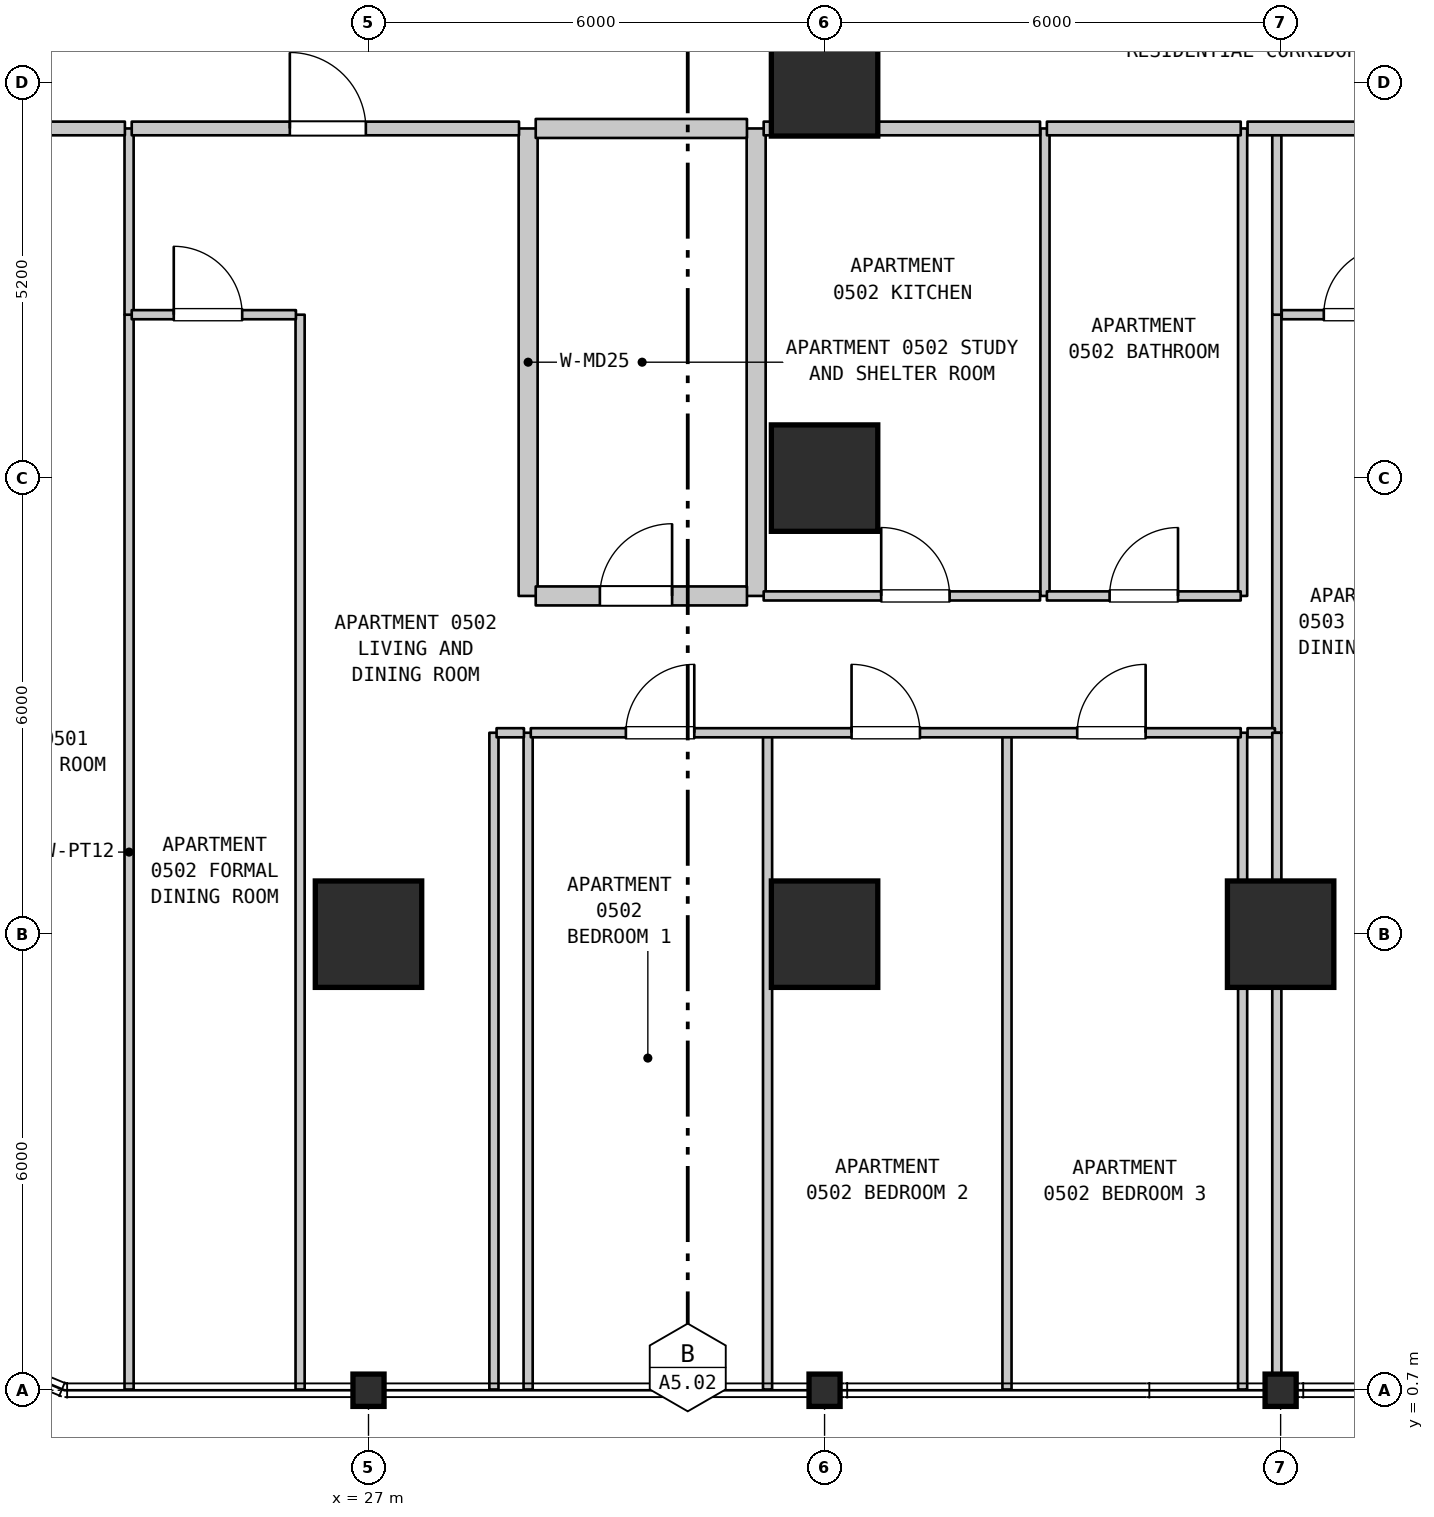
"""IFC4 building model, lengths in metres.
Left out: names, types, materials, properties, quantities, classifications, styles, units other than length and angle.
Written with IfcOpenShell. Run it as: python <this file> out.ifc"""

import sys

from ifc_helpers import new_model, si_unit, direction, frame, frame_2d, origin, origin_2d, place, context, subcontext, project, spatial, rectangle, i_section, extrude, element, fill, save


model = new_model("IFC4")
c1 = context("Model", 3, precision=1e-05, world=origin(), true_north=direction((0.0, 1.0)))
c2 = subcontext(c1, "Body", "Model", "MODEL_VIEW")
j1 = project(units=[si_unit("LENGTHUNIT", "METRE"), si_unit("PLANEANGLEUNIT", "RADIAN")], contexts=[c1])
p1 = place(None, origin())
s1 = spatial("IfcSite", under=j1, at=p1, CompositionType="ELEMENT")
p2 = place(p1, origin())
s2 = spatial("IfcBuilding", under=s1, at=p2, CompositionType="ELEMENT")
p3 = place(p2, frame((0.0, 0.0, 27.7)))
s3 = spatial("IfcBuildingStorey", under=s2, at=p3, CompositionType="ELEMENT", Elevation=27.7)
p4 = place(p3, frame((27.0, 0.7, 0.0), z_axis=(0.0, 0.0, 1.0), x_axis=(1.0, 0.0, 0.0)))
e1 = element("IfcColumn", 1, at=p4, inside=s3, PredefinedType="COLUMN", context=c2, shape_type="SweptSolid", body=[
    extrude(i_section(OverallWidth=0.409, OverallDepth=0.425, WebThickness=0.032, FlangeThickness=0.052, FilletRadius=0.015, at=origin_2d()), origin(), (0.0, 0.0, 1.0), 3.7),
])
p5 = place(p3, frame((27.0, 6.7, 0.0), z_axis=(0.0, 0.0, 1.0), x_axis=(1.0, 0.0, 0.0)))
e2 = element("IfcColumn", 2, at=p5, inside=s3, PredefinedType="COLUMN", context=c2, shape_type="SweptSolid", body=[
    extrude(rectangle(XDim=1.4, YDim=1.4, at=origin_2d()), origin(), (0.0, 0.0, 1.0), 3.7),
])
p6 = place(p3, frame((33.0, 0.7, 0.0), z_axis=(0.0, 0.0, 1.0), x_axis=(1.0, 0.0, 0.0)))
e3 = element("IfcColumn", 3, at=p6, inside=s3, PredefinedType="COLUMN", context=c2, shape_type="SweptSolid", body=[
    extrude(i_section(OverallWidth=0.409, OverallDepth=0.425, WebThickness=0.032, FlangeThickness=0.052, FilletRadius=0.015, at=origin_2d()), origin(), (0.0, 0.0, 1.0), 3.7),
])
for number, where, z_axis, x_axis in (
    (4, (33.0, 6.7, 0.0), (0.0, 0.0, 1.0), (1.0, 0.0, 0.0)),
    (5, (33.0, 12.7, 0.0), (0.0, 0.0, 1.0), (1.0, 0.0, 0.0)),
    (6, (33.0, 17.9, 0.0), (0.0, 0.0, 1.0), (1.0, 0.0, 0.0)),
):
    element("IfcColumn", number, at=place(p3, frame(where, z_axis=z_axis, x_axis=x_axis)), inside=s3, PredefinedType="COLUMN", context=c2, shape_type="SweptSolid", body=[
        extrude(rectangle(XDim=1.4, YDim=1.4, at=origin_2d()), origin(), (0.0, 0.0, 1.0), 3.7),
    ])
p7 = place(p3, frame((39.0, 0.7, 0.0), z_axis=(0.0, 0.0, 1.0), x_axis=(1.0, 0.0, 0.0)))
e7 = element("IfcColumn", 7, at=p7, inside=s3, PredefinedType="COLUMN", context=c2, shape_type="SweptSolid", body=[
    extrude(i_section(OverallWidth=0.409, OverallDepth=0.425, WebThickness=0.032, FlangeThickness=0.052, FilletRadius=0.015, at=origin_2d()), origin(), (0.0, 0.0, 1.0), 3.7),
])
p8 = place(p3, frame((39.0, 6.7, 0.0), z_axis=(0.0, 0.0, 1.0), x_axis=(1.0, 0.0, 0.0)))
e8 = element("IfcColumn", 8, at=p8, inside=s3, PredefinedType="COLUMN", context=c2, shape_type="SweptSolid", body=[
    extrude(rectangle(XDim=1.4, YDim=1.4, at=origin_2d()), origin(), (0.0, 0.0, 1.0), 3.7),
])
p9 = place(p3, frame((23.85, 0.71, 0.0), z_axis=(0.0, 0.0, 1.0), x_axis=(0.0, 1.0, 0.0)))
e9 = element("IfcWall", 9, at=p9, inside=s3, PredefinedType="PARTITIONING", context=c2, shape_type="SweptSolid", body=[
    extrude(rectangle(XDim=14.14, YDim=0.12, at=frame_2d((7.07, 0.0))), origin(), (0.0, 0.0, 1.0), 3.385),
])
p10 = place(p3, frame((23.85, 14.85, 0.0), z_axis=(0.0, 0.0, 1.0), x_axis=(0.0, 1.0, 0.0)))
e10 = element("IfcWall", 10, at=p10, inside=s3, PredefinedType="PARTITIONING", context=c2, shape_type="SweptSolid", body=[
    extrude(rectangle(XDim=2.45, YDim=0.12, at=frame_2d((1.225, 0.0))), origin(), (0.0, 0.0, 1.0), 3.385),
])
p11 = place(p3, frame((26.1, 0.71, 0.0), z_axis=(0.0, 0.0, 1.0), x_axis=(0.0, 1.0, 0.0)))
e11 = element("IfcWall", 11, at=p11, inside=s3, PredefinedType="PARTITIONING", context=c2, shape_type="SweptSolid", body=[
    extrude(rectangle(XDim=14.14, YDim=0.12, at=frame_2d((7.07, 0.0))), origin(), (0.0, 0.0, 1.0), 3.385),
])
for number, where, z_axis, x_axis in (
    (12, (28.65, 0.71, 0.0), (0.0, 0.0, 1.0), (0.0, 1.0, 0.0)),
    (13, (29.1, 0.71, 0.0), (0.0, 0.0, 1.0), (0.0, 1.0, 0.0)),
):
    element("IfcWall", number, at=place(p3, frame(where, z_axis=z_axis, x_axis=x_axis)), inside=s3, PredefinedType="PARTITIONING", context=c2, shape_type="SweptSolid", body=[
        extrude(rectangle(XDim=8.64, YDim=0.12, at=frame_2d((4.32, 0.0))), origin(), (0.0, 0.0, 1.0), 3.385),
    ])
for number, where, z_axis, x_axis in (
    (14, (29.1, 11.15, 0.0), (0.0, 0.0, 1.0), (0.0, 1.0, 0.0)),
    (15, (32.1, 11.15, 0.0), (0.0, 0.0, 1.0), (0.0, 1.0, 0.0)),
):
    element("IfcWall", number, at=place(p3, frame(where, z_axis=z_axis, x_axis=x_axis)), inside=s3, PredefinedType="STANDARD", context=c2, shape_type="SweptSolid", body=[
        extrude(rectangle(XDim=6.15, YDim=0.25, at=frame_2d((3.075, 0.0))), origin(), (0.0, 0.0, 1.0), 3.385),
    ])
for number, where, z_axis, x_axis in (
    (16, (32.25, 0.71, 0.0), (0.0, 0.0, 1.0), (0.0, 1.0, 0.0)),
    (17, (35.4, 0.71, 0.0), (0.0, 0.0, 1.0), (0.0, 1.0, 0.0)),
):
    element("IfcWall", number, at=place(p3, frame(where, z_axis=z_axis, x_axis=x_axis)), inside=s3, PredefinedType="PARTITIONING", context=c2, shape_type="SweptSolid", body=[
        extrude(rectangle(XDim=8.64, YDim=0.12, at=frame_2d((4.32, 0.0))), origin(), (0.0, 0.0, 1.0), 3.385),
    ])
p12 = place(p3, frame((35.9, 11.15, 0.0), z_axis=(0.0, 0.0, 1.0), x_axis=(0.0, 1.0, 0.0)))
e18 = element("IfcWall", 18, at=p12, inside=s3, PredefinedType="PARTITIONING", context=c2, shape_type="SweptSolid", body=[
    extrude(rectangle(XDim=6.15, YDim=0.12, at=frame_2d((3.075, 0.0))), origin(), (0.0, 0.0, 1.0), 3.385),
])
p13 = place(p3, frame((38.5, 0.71, 0.0), z_axis=(0.0, 0.0, 1.0), x_axis=(0.0, 1.0, 0.0)))
e19 = element("IfcWall", 19, at=p13, inside=s3, PredefinedType="PARTITIONING", context=c2, shape_type="SweptSolid", body=[
    extrude(rectangle(XDim=8.64, YDim=0.12, at=frame_2d((4.32, 0.0))), origin(), (0.0, 0.0, 1.0), 3.385),
])
p14 = place(p3, frame((38.5, 11.15, 0.0), z_axis=(0.0, 0.0, 1.0), x_axis=(0.0, 1.0, 0.0)))
e20 = element("IfcWall", 20, at=p14, inside=s3, PredefinedType="PARTITIONING", context=c2, shape_type="SweptSolid", body=[
    extrude(rectangle(XDim=6.15, YDim=0.12, at=frame_2d((3.075, 0.0))), origin(), (0.0, 0.0, 1.0), 3.385),
])
p15 = place(p3, frame((38.95, 0.71, 0.0), z_axis=(0.0, 0.0, 1.0), x_axis=(0.0, 1.0, 0.0)))
e21 = element("IfcWall", 21, at=p15, inside=s3, PredefinedType="PARTITIONING", context=c2, shape_type="SweptSolid", body=[
    extrude(rectangle(XDim=5.99, YDim=0.12, at=frame_2d((2.995, 0.0))), origin(), (0.0, 0.0, 1.0), 2.885),
])
p16 = place(p3, frame((38.95, 9.35, 0.0), z_axis=(0.0, 0.0, 1.0), x_axis=(0.0, 1.0, 0.0)))
e22 = element("IfcWall", 22, at=p16, inside=s3, PredefinedType="PARTITIONING", context=c2, shape_type="SweptSolid", body=[
    extrude(rectangle(XDim=5.5, YDim=0.12, at=frame_2d((2.75, 0.0))), origin(), (0.0, 0.0, 1.0), 3.385),
])
p17 = place(p3, frame((38.95, 14.85, 0.0), z_axis=(0.0, 0.0, 1.0), x_axis=(0.0, 1.0, 0.0)))
e23 = element("IfcWall", 23, at=p17, inside=s3, PredefinedType="PARTITIONING", context=c2, shape_type="SweptSolid", body=[
    extrude(rectangle(XDim=2.45, YDim=0.12, at=frame_2d((1.225, 0.0))), origin(), (0.0, 0.0, 1.0), 3.385),
])
p18 = place(p3, frame((28.685, 9.35, 0.0), z_axis=(0.0, 0.0, 1.0), x_axis=(1.0, 0.0, 0.0)))
e24 = element("IfcWall", 24, at=p18, inside=s3, PredefinedType="PARTITIONING", context=c2, shape_type="SweptSolid", body=[
    extrude(rectangle(XDim=0.36, YDim=0.12, at=frame_2d((0.18, 0.0))), origin(), (0.0, 0.0, 1.0), 3.385),
])
p19 = place(p3, frame((29.135, 9.35, 0.0), z_axis=(0.0, 0.0, 1.0), x_axis=(1.0, 0.0, 0.0)))
e25 = element("IfcWall", 25, at=p19, inside=s3, PredefinedType="PARTITIONING", context=c2, shape_type="SweptSolid", body=[
    extrude(rectangle(XDim=9.34, YDim=0.12, at=frame_2d((4.67, 0.0))), origin(), (0.0, 0.0, 1.0), 3.385),
])
p20 = place(p19, frame((1.251, 0.0, 0.0)))
e26 = element("IfcOpeningElement", 26, at=p20, cuts=e25, PredefinedType="OPENING", context=c2, shape_type="SweptSolid", body=[
    extrude(rectangle(XDim=0.9, YDim=2.15, at=frame_2d((0.45, 1.075))), frame((0.0, 0.07, 0.0), z_axis=(0.0, -1.0, 0.0), x_axis=(1.0, 0.0, 0.0)), (0.0, 0.0, 1.0), 0.14),
])
p21 = place(p19, frame((4.22, 0.0, 0.0)))
e27 = element("IfcOpeningElement", 27, at=p21, cuts=e25, PredefinedType="OPENING", context=c2, shape_type="SweptSolid", body=[
    extrude(rectangle(XDim=0.9, YDim=2.15, at=frame_2d((0.45, 1.075))), frame((0.0, 0.07, 0.0), z_axis=(0.0, -1.0, 0.0), x_axis=(1.0, 0.0, 0.0)), (0.0, 0.0, 1.0), 0.14),
])
p22 = place(p19, frame((7.189, 0.0, 0.0)))
e28 = element("IfcOpeningElement", 28, at=p22, cuts=e25, PredefinedType="OPENING", context=c2, shape_type="SweptSolid", body=[
    extrude(rectangle(XDim=0.9, YDim=2.15, at=frame_2d((0.45, 1.075))), frame((0.0, 0.07, 0.0), z_axis=(0.0, -1.0, 0.0), x_axis=(1.0, 0.0, 0.0)), (0.0, 0.0, 1.0), 0.14),
])
p23 = place(p3, frame((38.565, 9.35, 0.0), z_axis=(0.0, 0.0, 1.0), x_axis=(1.0, 0.0, 0.0)))
e29 = element("IfcWall", 29, at=p23, inside=s3, PredefinedType="PARTITIONING", context=c2, shape_type="SweptSolid", body=[
    extrude(rectangle(XDim=0.36, YDim=0.12, at=frame_2d((0.18, 0.0))), origin(), (0.0, 0.0, 1.0), 3.385),
])
p24 = place(p3, frame((29.2, 11.15, 0.0), z_axis=(0.0, 0.0, 1.0), x_axis=(1.0, 0.0, 0.0)))
e30 = element("IfcWall", 30, at=p24, inside=s3, PredefinedType="STANDARD", context=c2, shape_type="SweptSolid", body=[
    extrude(rectangle(XDim=2.779, YDim=0.25, at=frame_2d((1.39, 0.0))), origin(), (0.0, 0.0, 1.0), 3.385),
])
p25 = place(p24, frame((0.844, 0.0, 0.0)))
e31 = element("IfcOpeningElement", 31, at=p25, cuts=e30, PredefinedType="OPENING", context=c2, shape_type="SweptSolid", body=[
    extrude(rectangle(XDim=0.95, YDim=2.15, at=frame_2d((0.475, 1.075))), frame((0.0, 0.135, 0.0), z_axis=(0.0, -1.0, 0.0), x_axis=(1.0, 0.0, 0.0)), (0.0, 0.0, 1.0), 0.27),
])
p26 = place(p3, frame((32.199, 11.15, 0.0), z_axis=(0.0, 0.0, 1.0), x_axis=(1.0, 0.0, 0.0)))
e32 = element("IfcWall", 32, at=p26, inside=s3, PredefinedType="PARTITIONING", context=c2, shape_type="SweptSolid", body=[
    extrude(rectangle(XDim=3.636, YDim=0.12, at=frame_2d((1.818, 0.0))), origin(), (0.0, 0.0, 1.0), 3.385),
])
p27 = place(p26, frame((1.546, 0.0, 0.0)))
e33 = element("IfcOpeningElement", 33, at=p27, cuts=e32, PredefinedType="OPENING", context=c2, shape_type="SweptSolid", body=[
    extrude(rectangle(XDim=0.9, YDim=2.15, at=frame_2d((0.45, 1.075))), frame((0.0, 0.07, 0.0), z_axis=(0.0, -1.0, 0.0), x_axis=(1.0, 0.0, 0.0)), (0.0, 0.0, 1.0), 0.14),
])
p28 = place(p3, frame((35.925, 11.15, 0.0), z_axis=(0.0, 0.0, 1.0), x_axis=(1.0, 0.0, 0.0)))
e34 = element("IfcWall", 34, at=p28, inside=s3, PredefinedType="PARTITIONING", context=c2, shape_type="SweptSolid", body=[
    extrude(rectangle(XDim=2.55, YDim=0.12, at=frame_2d((1.275, 0.0))), origin(), (0.0, 0.0, 1.0), 3.385),
])
p29 = place(p28, frame((0.825, 0.0, 0.0)))
e35 = element("IfcOpeningElement", 35, at=p29, cuts=e34, PredefinedType="OPENING", context=c2, shape_type="SweptSolid", body=[
    extrude(rectangle(XDim=0.9, YDim=2.1, at=frame_2d((0.45, 1.05))), frame((0.0, 0.07, 0.0), z_axis=(0.0, -1.0, 0.0), x_axis=(1.0, 0.0, 0.0)), (0.0, 0.0, 1.0), 0.14),
])
p30 = place(p3, frame((23.885, 14.85, 0.0), z_axis=(0.0, 0.0, 1.0), x_axis=(1.0, 0.0, 0.0)))
e36 = element("IfcWall", 36, at=p30, inside=s3, PredefinedType="PARTITIONING", context=c2, shape_type="SweptSolid", body=[
    extrude(rectangle(XDim=2.16, YDim=0.12, at=frame_2d((1.08, 0.0))), origin(), (0.0, 0.0, 1.0), 3.385),
])
p31 = place(p30, frame((0.553, 0.0, 0.0)))
e37 = element("IfcOpeningElement", 37, at=p31, cuts=e36, PredefinedType="OPENING", context=c2, shape_type="SweptSolid", body=[
    extrude(rectangle(XDim=0.9, YDim=2.15, at=frame_2d((0.45, 1.075))), frame((0.0, 0.07, 0.0), z_axis=(0.0, -1.0, 0.0), x_axis=(1.0, 0.0, 0.0)), (0.0, 0.0, 1.0), 0.14),
])
p32 = place(p3, frame((39.015, 14.85, 0.0), z_axis=(0.0, 0.0, 1.0), x_axis=(1.0, 0.0, 0.0)))
e38 = element("IfcWall", 38, at=p32, inside=s3, PredefinedType="PARTITIONING", context=c2, shape_type="SweptSolid", body=[
    extrude(rectangle(XDim=2.16, YDim=0.12, at=frame_2d((1.08, 0.0))), origin(), (0.0, 0.0, 1.0), 3.385),
])
p33 = place(p32, frame((0.553, 0.0, 0.0)))
e39 = element("IfcOpeningElement", 39, at=p33, cuts=e38, PredefinedType="OPENING", context=c2, shape_type="SweptSolid", body=[
    extrude(rectangle(XDim=0.9, YDim=2.15, at=frame_2d((0.45, 1.075))), frame((0.0, 0.07, 0.0), z_axis=(0.0, -1.0, 0.0), x_axis=(1.0, 0.0, 0.0)), (0.0, 0.0, 1.0), 0.14),
])
p34 = place(p3, frame((21.385, 17.3, 0.0), z_axis=(0.0, 0.0, 1.0), x_axis=(1.0, 0.0, 0.0)))
e40 = element("IfcWall", 40, at=p34, inside=s3, PredefinedType="STANDARD", context=c2, shape_type="SweptSolid", body=[
    extrude(rectangle(XDim=2.41, YDim=0.18, at=frame_2d((1.205, 0.0))), origin(), (0.0, 0.0, 1.0), 3.385),
])
p35 = place(p3, frame((23.885, 17.3, 0.0), z_axis=(0.0, 0.0, 1.0), x_axis=(1.0, 0.0, 0.0)))
e41 = element("IfcWall", 41, at=p35, inside=s3, PredefinedType="STANDARD", context=c2, shape_type="SweptSolid", body=[
    extrude(rectangle(XDim=5.095, YDim=0.18, at=frame_2d((2.547, 0.0))), origin(), (0.0, 0.0, 1.0), 3.385),
])
p36 = place(p35, frame((2.08, 0.0, 0.0)))
e42 = element("IfcOpeningElement", 42, at=p36, cuts=e41, PredefinedType="OPENING", context=c2, shape_type="SweptSolid", body=[
    extrude(rectangle(XDim=1.0, YDim=2.15, at=frame_2d((0.5, 1.075))), frame((0.0, 0.1, 0.0), z_axis=(0.0, -1.0, 0.0), x_axis=(1.0, 0.0, 0.0)), (0.0, 0.0, 1.0), 0.2),
])
p37 = place(p3, frame((29.2, 17.3, 0.0), z_axis=(0.0, 0.0, 1.0), x_axis=(1.0, 0.0, 0.0)))
e43 = element("IfcWall", 43, at=p37, inside=s3, PredefinedType="STANDARD", context=c2, shape_type="SweptSolid", body=[
    extrude(rectangle(XDim=2.779, YDim=0.25, at=frame_2d((1.39, 0.0))), origin(), (0.0, 0.0, 1.0), 3.385),
])
p38 = place(p3, frame((32.199, 17.3, 0.0), z_axis=(0.0, 0.0, 1.0), x_axis=(1.0, 0.0, 0.0)))
e44 = element("IfcWall", 44, at=p38, inside=s3, PredefinedType="STANDARD", context=c2, shape_type="SweptSolid", body=[
    extrude(rectangle(XDim=3.636, YDim=0.18, at=frame_2d((1.818, 0.0))), origin(), (0.0, 0.0, 1.0), 3.385),
])
p39 = place(p3, frame((35.925, 17.3, 0.0), z_axis=(0.0, 0.0, 1.0), x_axis=(1.0, 0.0, 0.0)))
e45 = element("IfcWall", 45, at=p39, inside=s3, PredefinedType="STANDARD", context=c2, shape_type="SweptSolid", body=[
    extrude(rectangle(XDim=2.55, YDim=0.18, at=frame_2d((1.275, 0.0))), origin(), (0.0, 0.0, 1.0), 3.385),
])
p40 = place(p3, frame((38.565, 17.3, 0.0), z_axis=(0.0, 0.0, 1.0), x_axis=(1.0, 0.0, 0.0)))
e46 = element("IfcWall", 46, at=p40, inside=s3, PredefinedType="STANDARD", context=c2, shape_type="SweptSolid", body=[
    extrude(rectangle(XDim=5.545, YDim=0.18, at=frame_2d((2.772, 0.0))), origin(), (0.0, 0.0, 1.0), 3.385),
])
p41 = place(p40, frame((2.435, 0.0, 0.0)))
e47 = element("IfcOpeningElement", 47, at=p41, cuts=e46, PredefinedType="OPENING", context=c2, shape_type="SweptSolid", body=[
    extrude(rectangle(XDim=1.0, YDim=2.15, at=frame_2d((0.5, 1.075))), frame((0.0, 0.1, 0.0), z_axis=(0.0, -1.0, 0.0), x_axis=(1.0, 0.0, 0.0)), (0.0, 0.0, 1.0), 0.2),
])
p42 = place(p3, frame((38.95, 6.7, 0.0), z_axis=(0.0, 0.0, 1.0), x_axis=(0.0, 1.0, 0.0)))
e48 = element("IfcWall", 48, at=p42, inside=s3, PredefinedType="PARTITIONING", context=c2, shape_type="SweptSolid", body=[
    extrude(rectangle(XDim=2.65, YDim=0.12, at=frame_2d((1.325, 0.0))), origin(), (0.0, 0.0, 1.0), 3.385),
])
p43 = place(p20, origin())
e49 = element("IfcDoor", 49, at=p43, inside=s3, OperationType="SINGLE_SWING_RIGHT", PredefinedType="DOOR", context=c2, shape_type="SweptSolid", body=[
    extrude(rectangle(XDim=0.9, YDim=2.15, at=frame_2d((0.45, 1.075))), frame((0.0, 0.025, 0.0), z_axis=(0.0, -1.0, 0.0), x_axis=(1.0, 0.0, 0.0)), (0.0, 0.0, 1.0), 0.05),
])
fill(e26, e49)
p44 = place(p21, origin())
e50 = element("IfcDoor", 50, at=p44, inside=s3, OperationType="SINGLE_SWING_LEFT", PredefinedType="DOOR", context=c2, shape_type="SweptSolid", body=[
    extrude(rectangle(XDim=0.9, YDim=2.15, at=frame_2d((0.45, 1.075))), frame((0.0, 0.025, 0.0), z_axis=(0.0, -1.0, 0.0), x_axis=(1.0, 0.0, 0.0)), (0.0, 0.0, 1.0), 0.05),
])
fill(e27, e50)
p45 = place(p22, origin())
e51 = element("IfcDoor", 51, at=p45, inside=s3, OperationType="SINGLE_SWING_RIGHT", PredefinedType="DOOR", context=c2, shape_type="SweptSolid", body=[
    extrude(rectangle(XDim=0.9, YDim=2.15, at=frame_2d((0.45, 1.075))), frame((0.0, 0.025, 0.0), z_axis=(0.0, -1.0, 0.0), x_axis=(1.0, 0.0, 0.0)), (0.0, 0.0, 1.0), 0.05),
])
fill(e28, e51)
p46 = place(p25, origin())
e52 = element("IfcDoor", 52, at=p46, inside=s3, OperationType="SINGLE_SWING_RIGHT", PredefinedType="DOOR", context=c2, shape_type="SweptSolid", body=[
    extrude(rectangle(XDim=0.95, YDim=2.15, at=frame_2d((0.475, 1.075))), frame((0.0, 0.025, 0.0), z_axis=(0.0, -1.0, 0.0), x_axis=(1.0, 0.0, 0.0)), (0.0, 0.0, 1.0), 0.05),
])
fill(e31, e52)
p47 = place(p27, origin())
e53 = element("IfcDoor", 53, at=p47, inside=s3, OperationType="SINGLE_SWING_LEFT", PredefinedType="DOOR", context=c2, shape_type="SweptSolid", body=[
    extrude(rectangle(XDim=0.9, YDim=2.15, at=frame_2d((0.45, 1.075))), frame((0.0, 0.025, 0.0), z_axis=(0.0, -1.0, 0.0), x_axis=(1.0, 0.0, 0.0)), (0.0, 0.0, 1.0), 0.05),
])
fill(e33, e53)
p48 = place(p29, origin())
e54 = element("IfcDoor", 54, at=p48, inside=s3, OperationType="SINGLE_SWING_RIGHT", PredefinedType="DOOR", context=c2, shape_type="SweptSolid", body=[
    extrude(rectangle(XDim=0.9, YDim=2.1, at=frame_2d((0.45, 1.05))), frame((0.0, 0.025, 0.0), z_axis=(0.0, -1.0, 0.0), x_axis=(1.0, 0.0, 0.0)), (0.0, 0.0, 1.0), 0.05),
])
fill(e35, e54)
p49 = place(p31, origin())
e55 = element("IfcDoor", 55, at=p49, inside=s3, OperationType="SINGLE_SWING_LEFT", PredefinedType="DOOR", context=c2, shape_type="SweptSolid", body=[
    extrude(rectangle(XDim=0.9, YDim=2.15, at=frame_2d((0.45, 1.075))), frame((0.0, 0.025, 0.0), z_axis=(0.0, -1.0, 0.0), x_axis=(1.0, 0.0, 0.0)), (0.0, 0.0, 1.0), 0.05),
])
fill(e37, e55)
p50 = place(p33, origin())
e56 = element("IfcDoor", 56, at=p50, inside=s3, OperationType="SINGLE_SWING_RIGHT", PredefinedType="DOOR", context=c2, shape_type="SweptSolid", body=[
    extrude(rectangle(XDim=0.9, YDim=2.15, at=frame_2d((0.45, 1.075))), frame((0.0, 0.025, 0.0), z_axis=(0.0, -1.0, 0.0), x_axis=(1.0, 0.0, 0.0)), (0.0, 0.0, 1.0), 0.05),
])
fill(e39, e56)
p51 = place(p36, origin())
e57 = element("IfcDoor", 57, at=p51, inside=s3, OperationType="SINGLE_SWING_LEFT", PredefinedType="DOOR", context=c2, shape_type="SweptSolid", body=[
    extrude(rectangle(XDim=1.0, YDim=2.15, at=frame_2d((0.5, 1.075))), frame((0.0, 0.025, 0.0), z_axis=(0.0, -1.0, 0.0), x_axis=(1.0, 0.0, 0.0)), (0.0, 0.0, 1.0), 0.05),
])
fill(e42, e57)
save(model, sys.argv[1])
